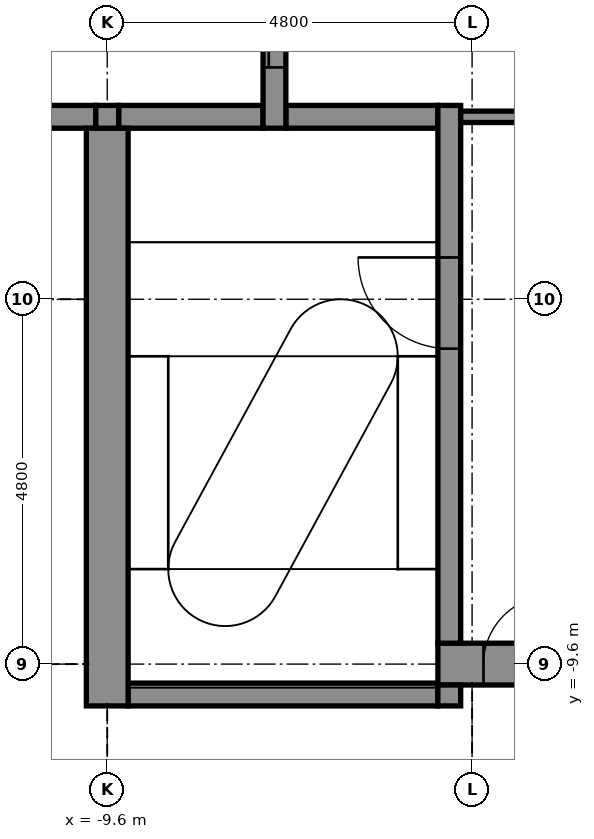
"""IFC4 building model, lengths in metres.
Left out: names, types, materials, properties, quantities, classifications, styles, units other than length and angle.
Written with IfcOpenShell. Run it as: python <this file> out.ifc"""

import sys

from ifc_helpers import new_model, si_unit, direction, frame, frame_2d, origin, place, context, subcontext, project, spatial, rectangle, extrude, element, fill, save


model = new_model("IFC4")
c1 = context("Model", 3, precision=1e-05, world=origin(), true_north=direction((0.0, 1.0)))
c2 = subcontext(c1, "Body", "Model", "MODEL_VIEW")
j1 = project(units=[si_unit("LENGTHUNIT", "METRE"), si_unit("PLANEANGLEUNIT", "RADIAN")], contexts=[c1])
p1 = place(None, origin())
s1 = spatial("IfcSite", under=j1, at=p1, CompositionType="ELEMENT")
p2 = place(p1, origin())
s2 = spatial("IfcBuilding", under=s1, at=p2, CompositionType="ELEMENT")
p3 = place(p2, frame((0.0, 0.0, 254.0)))
s3 = spatial("IfcBuildingStorey", under=s2, at=p3, CompositionType="ELEMENT", Elevation=254.0)
p4 = place(p3, frame((-9.325, -10.0, -0.15), z_axis=(0.0, 0.0, 1.0), x_axis=(1.0, 0.0, 0.0)))
e1 = element("IfcWall", 1, at=p4, inside=s3, PredefinedType="STANDARD", context=c2, shape_type="SweptSolid", body=[
    extrude(rectangle(XDim=4.075, YDim=0.3, at=frame_2d((2.038, 0.0))), origin(), (0.0, 0.0, 1.0), 3.9),
])
p5 = place(p3, frame((-5.25, -9.6, -0.15), z_axis=(0.0, 0.0, 1.0), x_axis=(1.0, 0.0, 0.0)))
e2 = element("IfcWall", 2, at=p5, inside=s3, PredefinedType="SHEAR", context=c2, shape_type="SweptSolid", body=[
    extrude(rectangle(XDim=10.2, YDim=0.55, at=frame_2d((5.1, 0.0))), origin(), (0.0, 0.0, 1.0), 3.9),
])
p6 = place(p5, frame((0.6, 0.0, 0.15)))
e3 = element("IfcOpeningElement", 3, at=p6, cuts=e2, PredefinedType="OPENING", context=c2, shape_type="SweptSolid", body=[
    extrude(rectangle(XDim=0.9, YDim=2.1, at=frame_2d((0.45, 1.05))), frame((0.0, 0.285, 0.0), z_axis=(0.0, -1.0, 0.0), x_axis=(1.0, 0.0, 0.0)), (0.0, 0.0, 1.0), 0.57),
])
p7 = place(p3, frame((-10.85, -2.4, -0.15), z_axis=(0.0, 0.0, 1.0), x_axis=(1.0, 0.0, 0.0)))
e4 = element("IfcWall", 4, at=p7, inside=s3, PredefinedType="STANDARD", context=c2, shape_type="SweptSolid", body=[
    extrude(rectangle(XDim=1.1, YDim=0.3, at=frame_2d((0.55, 0.0))), origin(), (0.0, 0.0, 1.0), 3.9),
])
p8 = place(p3, frame((-9.45, -2.4, -0.15), z_axis=(0.0, 0.0, 1.0), x_axis=(1.0, 0.0, 0.0)))
e5 = element("IfcWall", 5, at=p8, inside=s3, PredefinedType="STANDARD", context=c2, shape_type="SweptSolid", body=[
    extrude(rectangle(XDim=1.9, YDim=0.3, at=frame_2d((0.95, 0.0))), origin(), (0.0, 0.0, 1.0), 3.9),
])
p9 = place(p3, frame((-7.25, -2.4, -0.15), z_axis=(0.0, 0.0, 1.0), x_axis=(1.0, 0.0, 0.0)))
e6 = element("IfcWall", 6, at=p9, inside=s3, PredefinedType="STANDARD", context=c2, shape_type="SweptSolid", body=[
    extrude(rectangle(XDim=2.0, YDim=0.3, at=frame_2d((1.0, 0.0))), origin(), (0.0, 0.0, 1.0), 3.9),
])
p10 = place(p3, frame((-9.6, -10.15, -0.15), z_axis=(0.0, 0.0, 1.0), x_axis=(0.0, 1.0, 0.0)))
e7 = element("IfcWall", 7, at=p10, inside=s3, PredefinedType="SHEAR", context=c2, shape_type="SweptSolid", body=[
    extrude(rectangle(XDim=7.6, YDim=0.55, at=frame_2d((3.8, 0.0))), origin(), (0.0, 0.0, 1.0), 3.9),
])
p11 = place(p3, frame((-9.6, -2.55, -0.15), z_axis=(0.0, 0.0, 1.0), x_axis=(0.0, 1.0, 0.0)))
e8 = element("IfcWall", 8, at=p11, inside=s3, PredefinedType="STANDARD", context=c2, shape_type="SweptSolid", body=[
    extrude(rectangle(XDim=0.3, YDim=0.3, at=frame_2d((0.15, 0.0))), origin(), (0.0, 0.0, 1.0), 3.9),
])
p12 = place(p3, frame((-7.4, -2.55, -0.15), z_axis=(0.0, 0.0, 1.0), x_axis=(0.0, 1.0, 0.0)))
e9 = element("IfcWall", 9, at=p12, inside=s3, PredefinedType="STANDARD", context=c2, shape_type="SweptSolid", body=[
    extrude(rectangle(XDim=5.1, YDim=0.3, at=frame_2d((2.55, 0.0))), origin(), (0.0, 0.0, 1.0), 3.9),
])
p13 = place(p12, frame((0.8, 0.0, 0.15)))
e10 = element("IfcOpeningElement", 10, at=p13, cuts=e9, PredefinedType="OPENING", context=c2, shape_type="SweptSolid", body=[
    extrude(rectangle(XDim=1.1, YDim=2.1, at=frame_2d((0.55, 1.05))), frame((0.0, 0.16, 0.0), z_axis=(0.0, -1.0, 0.0), x_axis=(1.0, 0.0, 0.0)), (0.0, 0.0, 1.0), 0.32),
])
p14 = place(p12, frame((3.2, 0.0, 0.15)))
e11 = element("IfcOpeningElement", 11, at=p14, cuts=e9, PredefinedType="OPENING", context=c2, shape_type="SweptSolid", body=[
    extrude(rectangle(XDim=1.1, YDim=2.1, at=frame_2d((0.55, 1.05))), frame((0.0, 0.16, 0.0), z_axis=(0.0, -1.0, 0.0), x_axis=(1.0, 0.0, 0.0)), (0.0, 0.0, 1.0), 0.32),
])
p15 = place(p3, frame((-5.1, -10.15, -0.15), z_axis=(0.0, 0.0, 1.0), x_axis=(0.0, 1.0, 0.0)))
e12 = element("IfcWall", 12, at=p15, inside=s3, PredefinedType="STANDARD", context=c2, shape_type="SweptSolid", body=[
    extrude(rectangle(XDim=0.275, YDim=0.3, at=frame_2d((0.137, 0.0))), origin(), (0.0, 0.0, 1.0), 3.9),
])
p16 = place(p3, frame((-5.1, -9.325, -0.15), z_axis=(0.0, 0.0, 1.0), x_axis=(0.0, 1.0, 0.0)))
e13 = element("IfcWall", 13, at=p16, inside=s3, PredefinedType="STANDARD", context=c2, shape_type="SweptSolid", body=[
    extrude(rectangle(XDim=7.075, YDim=0.3, at=frame_2d((3.538, 0.0))), origin(), (0.0, 0.0, 1.0), 3.9),
])
p17 = place(p16, frame((3.875, 0.0, 0.15)))
e14 = element("IfcOpeningElement", 14, at=p17, cuts=e13, PredefinedType="OPENING", context=c2, shape_type="SweptSolid", body=[
    extrude(rectangle(XDim=1.2, YDim=2.1, at=frame_2d((0.6, 1.05))), frame((0.0, 0.16, 0.0), z_axis=(0.0, -1.0, 0.0), x_axis=(1.0, 0.0, 0.0)), (0.0, 0.0, 1.0), 0.32),
])
p18 = place(p3, frame((-4.95, -2.4, 0.0), z_axis=(0.0, 0.0, 1.0), x_axis=(1.0, 0.0, 0.0)))
e15 = element("IfcWall", 15, at=p18, inside=s3, PredefinedType="PARTITIONING", context=c2, shape_type="SweptSolid", body=[
    extrude(rectangle(XDim=1.2, YDim=0.15, at=frame_2d((0.6, 0.0))), origin(), (0.0, 0.0, 1.0), 3.75),
])
p19 = place(p13, origin())
e16 = element("IfcDoor", 16, at=p19, inside=s3, OperationType="DOUBLE_DOOR_SLIDING", PredefinedType="DOOR", context=c2, shape_type="SweptSolid", body=[
    extrude(rectangle(XDim=1.1, YDim=2.1, at=frame_2d((0.55, 1.05))), frame((0.0, 0.025, 0.0), z_axis=(0.0, -1.0, 0.0), x_axis=(1.0, 0.0, 0.0)), (0.0, 0.0, 1.0), 0.05),
])
fill(e10, e16)
p20 = place(p17, origin())
e17 = element("IfcDoor", 17, at=p20, inside=s3, OperationType="SINGLE_SWING_RIGHT", PredefinedType="DOOR", context=c2, shape_type="SweptSolid", body=[
    extrude(rectangle(XDim=1.2, YDim=2.1, at=frame_2d((0.6, 1.05))), frame((0.0, 0.025, 0.0), z_axis=(0.0, -1.0, 0.0), x_axis=(1.0, 0.0, 0.0)), (0.0, 0.0, 1.0), 0.05),
])
fill(e14, e17)
p21 = place(p6, origin())
e18 = element("IfcDoor", 18, at=p21, inside=s3, OperationType="SINGLE_SWING_RIGHT", PredefinedType="DOOR", context=c2, shape_type="SweptSolid", body=[
    extrude(rectangle(XDim=0.9, YDim=2.1, at=frame_2d((0.45, 1.05))), frame((0.0, 0.025, 0.0), z_axis=(0.0, -1.0, 0.0), x_axis=(1.0, 0.0, 0.0)), (0.0, 0.0, 1.0), 0.05),
])
fill(e3, e18)
save(model, sys.argv[1])
